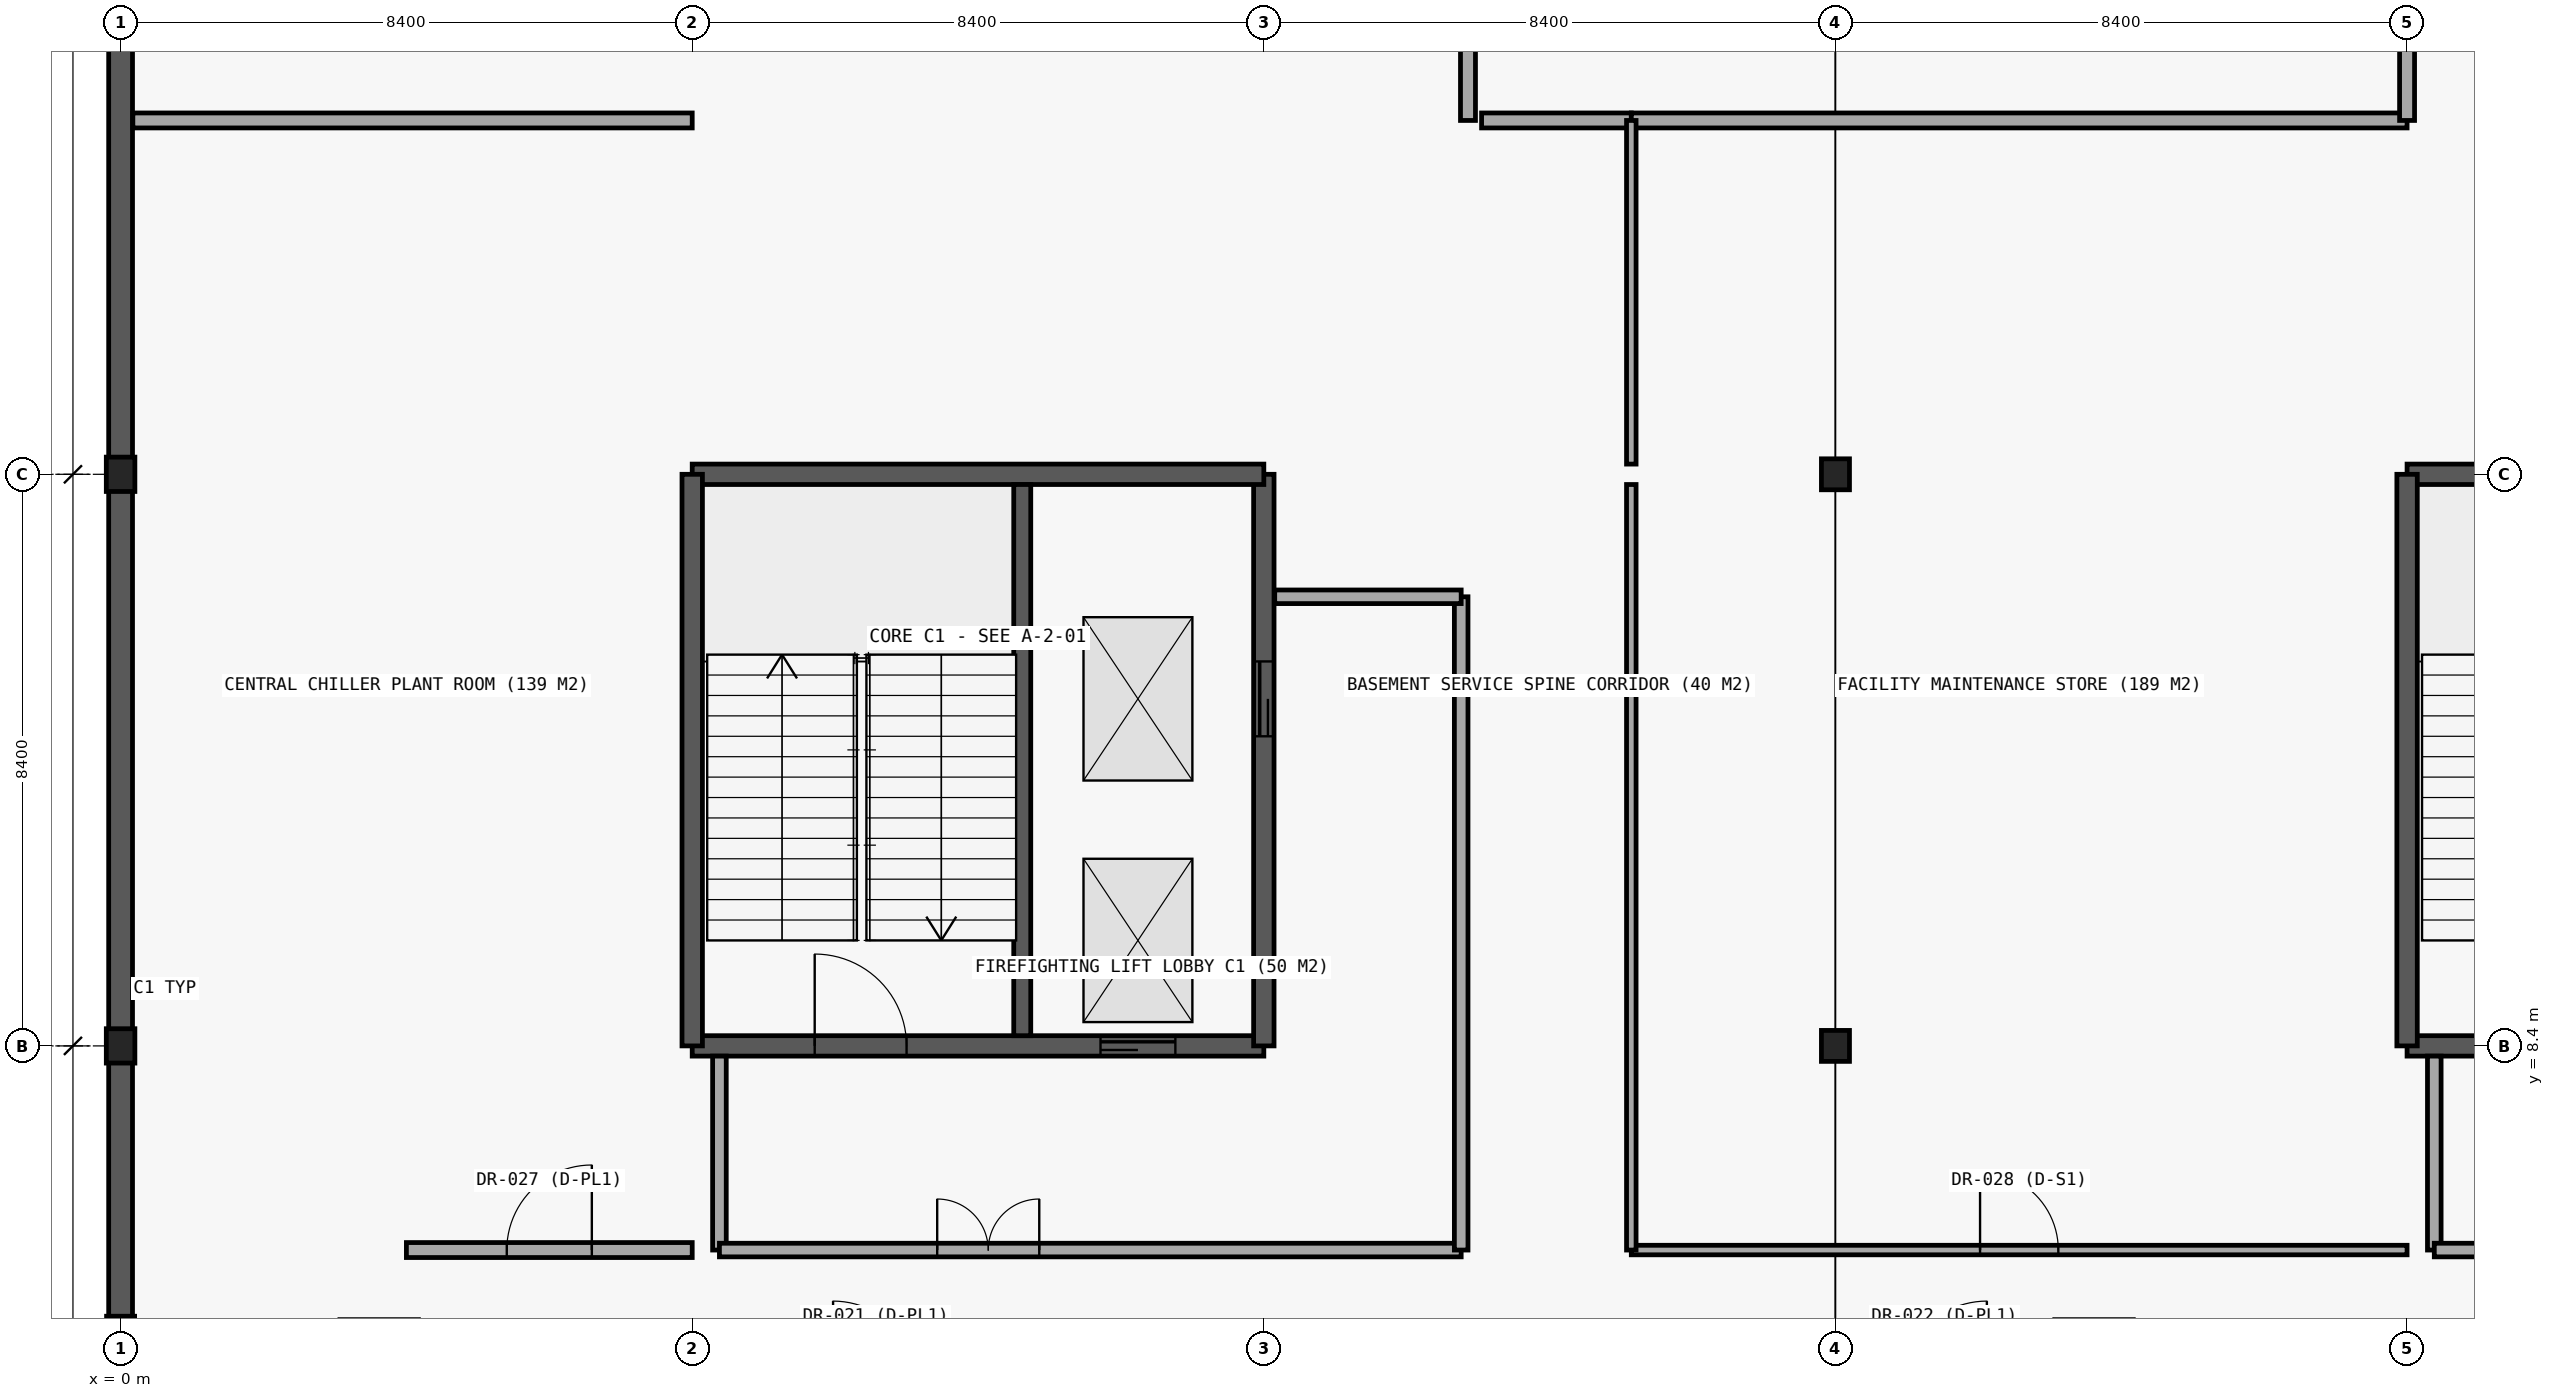
"""IFC4 building model, lengths in metres.
Left out: names, types, materials, properties, quantities, classifications, styles, units other than length and angle.
Written with IfcOpenShell. Run it as: python <this file> out.ifc"""

import sys

from ifc_helpers import new_model, si_unit, direction, frame, frame_2d, origin, origin_2d, place, context, subcontext, project, spatial, rectangle, i_section, extrude, element, fill, save


model = new_model("IFC4")
c1 = context("Model", 3, precision=1e-05, world=origin(), true_north=direction((0.0, 1.0)))
c2 = subcontext(c1, "Body", "Model", "MODEL_VIEW")
j1 = project(units=[si_unit("LENGTHUNIT", "METRE"), si_unit("PLANEANGLEUNIT", "RADIAN")], contexts=[c1])
p1 = place(None, origin())
s1 = spatial("IfcSite", under=j1, at=p1, CompositionType="ELEMENT")
p2 = place(p1, origin())
s2 = spatial("IfcBuilding", under=s1, at=p2, CompositionType="ELEMENT")
p3 = place(p2, frame((0.0, 0.0, -4.5)))
s3 = spatial("IfcBuildingStorey", under=s2, at=p3, CompositionType="ELEMENT", Elevation=-4.5)
p4 = place(p3, frame((8.4, 8.4, -0.35), z_axis=(0.0, 0.0, 1.0), x_axis=(1.0, 0.0, 0.0)))
e1 = element("IfcWall", 1, at=p4, inside=s3, PredefinedType="SHEAR", context=c2, shape_type="SweptSolid", body=[
    extrude(rectangle(XDim=8.4, YDim=0.3, at=frame_2d((4.2, 0.0))), origin(), (0.0, 0.0, 1.0), 4.85),
])
p5 = place(p4, frame((1.8, 0.0, 0.35)))
e2 = element("IfcOpeningElement", 2, at=p5, cuts=e1, PredefinedType="OPENING", context=c2, shape_type="SweptSolid", body=[
    extrude(rectangle(XDim=1.35, YDim=2.2, at=frame_2d((0.675, 1.1))), frame((0.0, 0.16, 0.0), z_axis=(0.0, -1.0, 0.0), x_axis=(1.0, 0.0, 0.0)), (0.0, 0.0, 1.0), 0.32),
])
p6 = place(p4, frame((6.0, 0.0, 0.35)))
e3 = element("IfcOpeningElement", 3, at=p6, cuts=e1, PredefinedType="OPENING", context=c2, shape_type="SweptSolid", body=[
    extrude(rectangle(XDim=1.1, YDim=2.2, at=frame_2d((0.55, 1.1))), frame((0.0, 0.16, 0.0), z_axis=(0.0, -1.0, 0.0), x_axis=(1.0, 0.0, 0.0)), (0.0, 0.0, 1.0), 0.32),
])
p7 = place(p3, frame((16.8, 8.4, -0.35), z_axis=(0.0, 0.0, 1.0), x_axis=(0.0, 1.0, 0.0)))
e4 = element("IfcWall", 4, at=p7, inside=s3, PredefinedType="SHEAR", context=c2, shape_type="SweptSolid", body=[
    extrude(rectangle(XDim=8.4, YDim=0.3, at=frame_2d((4.2, 0.0))), origin(), (0.0, 0.0, 1.0), 4.85),
])
p8 = place(p7, frame((4.55, 0.0, 0.35)))
e5 = element("IfcOpeningElement", 5, at=p8, cuts=e4, PredefinedType="OPENING", context=c2, shape_type="SweptSolid", body=[
    extrude(rectangle(XDim=1.1, YDim=2.2, at=frame_2d((0.55, 1.1))), frame((0.0, 0.16, 0.0), z_axis=(0.0, -1.0, 0.0), x_axis=(1.0, 0.0, 0.0)), (0.0, 0.0, 1.0), 0.32),
])
for number, where, z_axis, x_axis in (
    (6, (16.8, 16.8, -0.35), (0.0, 0.0, 1.0), (-1.0, 0.0, 0.0)),
    (7, (8.4, 16.8, -0.35), (0.0, 0.0, 1.0), (0.0, -1.0, 0.0)),
):
    element("IfcWall", number, at=place(p3, frame(where, z_axis=z_axis, x_axis=x_axis)), inside=s3, PredefinedType="SHEAR", context=c2, shape_type="SweptSolid", body=[
        extrude(rectangle(XDim=8.4, YDim=0.3, at=frame_2d((4.2, 0.0))), origin(), (0.0, 0.0, 1.0), 4.85),
    ])
p9 = place(p3, frame((13.25, 8.55, -0.35), z_axis=(0.0, 0.0, 1.0), x_axis=(0.0, 1.0, 0.0)))
e8 = element("IfcWall", 8, at=p9, inside=s3, PredefinedType="SHEAR", context=c2, shape_type="SweptSolid", body=[
    extrude(rectangle(XDim=8.1, YDim=0.25, at=frame_2d((4.05, 0.0))), origin(), (0.0, 0.0, 1.0), 4.85),
])
p10 = place(p3, frame((33.6, 8.4, -0.35), z_axis=(0.0, 0.0, 1.0), x_axis=(1.0, 0.0, 0.0)))
e9 = element("IfcWall", 9, at=p10, inside=s3, PredefinedType="SHEAR", context=c2, shape_type="SweptSolid", body=[
    extrude(rectangle(XDim=8.4, YDim=0.3, at=frame_2d((4.2, 0.0))), origin(), (0.0, 0.0, 1.0), 4.85),
])
p11 = place(p10, frame((1.8, 0.0, 0.35)))
e10 = element("IfcOpeningElement", 10, at=p11, cuts=e9, PredefinedType="OPENING", context=c2, shape_type="SweptSolid", body=[
    extrude(rectangle(XDim=1.35, YDim=2.2, at=frame_2d((0.675, 1.1))), frame((0.0, 0.16, 0.0), z_axis=(0.0, -1.0, 0.0), x_axis=(1.0, 0.0, 0.0)), (0.0, 0.0, 1.0), 0.32),
])
p12 = place(p10, frame((6.0, 0.0, 0.35)))
e11 = element("IfcOpeningElement", 11, at=p12, cuts=e9, PredefinedType="OPENING", context=c2, shape_type="SweptSolid", body=[
    extrude(rectangle(XDim=1.1, YDim=2.2, at=frame_2d((0.55, 1.1))), frame((0.0, 0.16, 0.0), z_axis=(0.0, -1.0, 0.0), x_axis=(1.0, 0.0, 0.0)), (0.0, 0.0, 1.0), 0.32),
])
p13 = place(p3, frame((42.0, 16.8, -0.35), z_axis=(0.0, 0.0, 1.0), x_axis=(-1.0, 0.0, 0.0)))
e12 = element("IfcWall", 12, at=p13, inside=s3, PredefinedType="SHEAR", context=c2, shape_type="SweptSolid", body=[
    extrude(rectangle(XDim=8.4, YDim=0.3, at=frame_2d((4.2, 0.0))), origin(), (0.0, 0.0, 1.0), 4.85),
])
p14 = place(p3, frame((33.6, 16.8, -0.35), z_axis=(0.0, 0.0, 1.0), x_axis=(0.0, -1.0, 0.0)))
e13 = element("IfcWall", 13, at=p14, inside=s3, PredefinedType="SHEAR", context=c2, shape_type="SweptSolid", body=[
    extrude(rectangle(XDim=8.4, YDim=0.3, at=frame_2d((4.2, 0.0))), origin(), (0.0, 0.0, 1.0), 4.85),
])
p15 = place(p3, frame((0.0, 16.8, -0.35), z_axis=(0.0, 0.0, 1.0), x_axis=(0.0, -1.0, 0.0)))
e14 = element("IfcWall", 14, at=p15, inside=s3, PredefinedType="SOLIDWALL", context=c2, shape_type="SweptSolid", body=[
    extrude(rectangle(XDim=8.4, YDim=0.35, at=frame_2d((4.2, 0.0))), origin(), (0.0, 0.0, 1.0), 4.6),
])
p16 = place(p3, frame((0.0, 25.2, -0.35), z_axis=(0.0, 0.0, 1.0), x_axis=(0.0, -1.0, 0.0)))
e15 = element("IfcWall", 15, at=p16, inside=s3, PredefinedType="SOLIDWALL", context=c2, shape_type="SweptSolid", body=[
    extrude(rectangle(XDim=8.4, YDim=0.35, at=frame_2d((4.2, 0.0))), origin(), (0.0, 0.0, 1.0), 4.6),
])
p17 = place(p3, frame((0.0, 8.4, -0.35), z_axis=(0.0, 0.0, 1.0), x_axis=(0.0, -1.0, 0.0)))
e16 = element("IfcWall", 16, at=p17, inside=s3, PredefinedType="SOLIDWALL", context=c2, shape_type="SweptSolid", body=[
    extrude(rectangle(XDim=4.2, YDim=0.35, at=frame_2d((2.1, 0.0))), origin(), (0.0, 0.0, 1.0), 4.6),
])
for number, where, z_axis, x_axis in (
    (17, (0.0, 8.4, -0.35), (0.0, 0.0, 1.0), (1.0, 0.0, 0.0)),
    (18, (0.0, 16.8, -0.35), (0.0, 0.0, 1.0), (1.0, 0.0, 0.0)),
):
    element("IfcColumn", number, at=place(p3, frame(where, z_axis=z_axis, x_axis=x_axis)), inside=s3, PredefinedType="COLUMN", context=c2, shape_type="SweptSolid", body=[
        extrude(i_section(OverallWidth=0.42, OverallDepth=0.505, WebThickness=0.037, FlangeThickness=0.059, FilletRadius=0.015, at=origin_2d()), origin(), (0.0, 0.0, 1.0), 4.85),
    ])
for number, where, z_axis, x_axis in (
    (19, (25.2, 8.4, -0.35), (0.0, 0.0, 1.0), (1.0, 0.0, 0.0)),
    (20, (25.2, 16.8, -0.35), (0.0, 0.0, 1.0), (1.0, 0.0, 0.0)),
    (21, (0.0, 4.2, -0.35), (0.0, 0.0, 1.0), (1.0, 0.0, 0.0)),
):
    element("IfcColumn", number, at=place(p3, frame(where, z_axis=z_axis, x_axis=x_axis)), inside=s3, PredefinedType="COLUMN", context=c2, shape_type="SweptSolid", body=[
        extrude(i_section(OverallWidth=0.412, OverallDepth=0.455, WebThickness=0.031, FlangeThickness=0.049, FilletRadius=0.015, at=origin_2d()), origin(), (0.0, 0.0, 1.0), 4.85),
    ])
p18 = place(p3, frame((8.8, 5.4, 0.0), z_axis=(0.0, 0.0, 1.0), x_axis=(0.0, 1.0, 0.0)))
e22 = element("IfcWall", 22, at=p18, inside=s3, PredefinedType="PARTITIONING", context=c2, shape_type="SweptSolid", body=[
    extrude(rectangle(XDim=2.85, YDim=0.2, at=frame_2d((1.425, 0.0))), origin(), (0.0, 0.0, 1.0), 3.82),
])
p19 = place(p3, frame((8.8, 5.4, 0.0), z_axis=(0.0, 0.0, 1.0), x_axis=(1.0, 0.0, 0.0)))
e23 = element("IfcWall", 23, at=p19, inside=s3, PredefinedType="PARTITIONING", context=c2, shape_type="SweptSolid", body=[
    extrude(rectangle(XDim=10.9, YDim=0.2, at=frame_2d((5.45, 0.0))), origin(), (0.0, 0.0, 1.0), 3.82),
])
p20 = place(p19, frame((3.2, 0.0, 0.0)))
e24 = element("IfcOpeningElement", 24, at=p20, cuts=e23, PredefinedType="OPENING", context=c2, shape_type="SweptSolid", body=[
    extrude(rectangle(XDim=1.5, YDim=2.2, at=frame_2d((0.75, 1.1))), frame((0.0, 0.11, 0.0), z_axis=(0.0, -1.0, 0.0), x_axis=(1.0, 0.0, 0.0)), (0.0, 0.0, 1.0), 0.22),
])
p21 = place(p3, frame((19.7, 5.4, 0.0), z_axis=(0.0, 0.0, 1.0), x_axis=(0.0, 1.0, 0.0)))
e25 = element("IfcWall", 25, at=p21, inside=s3, PredefinedType="PARTITIONING", context=c2, shape_type="SweptSolid", body=[
    extrude(rectangle(XDim=9.6, YDim=0.2, at=frame_2d((4.8, 0.0))), origin(), (0.0, 0.0, 1.0), 3.82),
])
p22 = place(p3, frame((16.96, 15.0, 0.0), z_axis=(0.0, 0.0, 1.0), x_axis=(1.0, 0.0, 0.0)))
e26 = element("IfcWall", 26, at=p22, inside=s3, PredefinedType="PARTITIONING", context=c2, shape_type="SweptSolid", body=[
    extrude(rectangle(XDim=2.74, YDim=0.2, at=frame_2d((1.37, 0.0))), origin(), (0.0, 0.0, 1.0), 3.82),
])
p23 = place(p3, frame((34.0, 5.4, 0.0), z_axis=(0.0, 0.0, 1.0), x_axis=(0.0, 1.0, 0.0)))
e27 = element("IfcWall", 27, at=p23, inside=s3, PredefinedType="PARTITIONING", context=c2, shape_type="SweptSolid", body=[
    extrude(rectangle(XDim=2.85, YDim=0.2, at=frame_2d((1.425, 0.0))), origin(), (0.0, 0.0, 1.0), 3.75),
])
p24 = place(p3, frame((34.0, 5.4, 0.0), z_axis=(0.0, 0.0, 1.0), x_axis=(1.0, 0.0, 0.0)))
e28 = element("IfcWall", 28, at=p24, inside=s3, PredefinedType="PARTITIONING", context=c2, shape_type="SweptSolid", body=[
    extrude(rectangle(XDim=7.6, YDim=0.2, at=frame_2d((3.8, 0.0))), origin(), (0.0, 0.0, 1.0), 3.82),
])
p25 = place(p24, frame((3.05, 0.0, 0.0)))
e29 = element("IfcOpeningElement", 29, at=p25, cuts=e28, PredefinedType="OPENING", context=c2, shape_type="SweptSolid", body=[
    extrude(rectangle(XDim=1.5, YDim=2.2, at=frame_2d((0.75, 1.1))), frame((0.0, 0.11, 0.0), z_axis=(0.0, -1.0, 0.0), x_axis=(1.0, 0.0, 0.0)), (0.0, 0.0, 1.0), 0.22),
])
p26 = place(p3, frame((4.2, 5.4, 0.0), z_axis=(0.0, 0.0, 1.0), x_axis=(1.0, 0.0, 0.0)))
e30 = element("IfcWall", 30, at=p26, inside=s3, PredefinedType="PARTITIONING", context=c2, shape_type="SweptSolid", body=[
    extrude(rectangle(XDim=4.2, YDim=0.22, at=frame_2d((2.1, 0.0))), origin(), (0.0, 0.0, 1.0), 3.8),
])
p27 = place(p26, frame((1.475, 0.0, 0.0)))
e31 = element("IfcOpeningElement", 31, at=p27, cuts=e30, PredefinedType="OPENING", context=c2, shape_type="SweptSolid", body=[
    extrude(rectangle(XDim=1.25, YDim=2.2, at=frame_2d((0.625, 1.1))), frame((0.0, 0.12, 0.0), z_axis=(0.0, -1.0, 0.0), x_axis=(1.0, 0.0, 0.0)), (0.0, 0.0, 1.0), 0.24),
])
p28 = place(p3, frame((22.2, 5.4, 0.0), z_axis=(0.0, 0.0, 1.0), x_axis=(1.0, 0.0, 0.0)))
e32 = element("IfcWall", 32, at=p28, inside=s3, PredefinedType="PARTITIONING", context=c2, shape_type="SweptSolid", body=[
    extrude(rectangle(XDim=11.4, YDim=0.14, at=frame_2d((5.7, 0.0))), origin(), (0.0, 0.0, 1.0), 3.8),
])
p29 = place(p28, frame((5.125, 0.0, 0.0)))
e33 = element("IfcOpeningElement", 33, at=p29, cuts=e32, PredefinedType="OPENING", context=c2, shape_type="SweptSolid", body=[
    extrude(rectangle(XDim=1.15, YDim=2.15, at=frame_2d((0.575, 1.075))), frame((0.0, 0.08, 0.0), z_axis=(0.0, -1.0, 0.0), x_axis=(1.0, 0.0, 0.0)), (0.0, 0.0, 1.0), 0.16),
])
p30 = place(p3, frame((0.18, 22.0, 0.0), z_axis=(0.0, 0.0, 1.0), x_axis=(1.0, 0.0, 0.0)))
e34 = element("IfcWall", 34, at=p30, inside=s3, PredefinedType="PARTITIONING", context=c2, shape_type="SweptSolid", body=[
    extrude(rectangle(XDim=8.22, YDim=0.22, at=frame_2d((4.11, 0.0))), origin(), (0.0, 0.0, 1.0), 3.8),
])
p31 = place(p3, frame((20.0, 22.0, 0.0), z_axis=(0.0, 0.0, 1.0), x_axis=(1.0, 0.0, 0.0)))
e35 = element("IfcWall", 35, at=p31, inside=s3, PredefinedType="PARTITIONING", context=c2, shape_type="SweptSolid", body=[
    extrude(rectangle(XDim=2.2, YDim=0.22, at=frame_2d((1.1, 0.0))), origin(), (0.0, 0.0, 1.0), 3.8),
])
p32 = place(p3, frame((22.2, 22.0, 0.0), z_axis=(0.0, 0.0, 1.0), x_axis=(1.0, 0.0, 0.0)))
e36 = element("IfcWall", 36, at=p32, inside=s3, PredefinedType="PARTITIONING", context=c2, shape_type="SweptSolid", body=[
    extrude(rectangle(XDim=11.4, YDim=0.22, at=frame_2d((5.7, 0.0))), origin(), (0.0, 0.0, 1.0), 3.8),
])
p33 = place(p3, frame((19.8, 22.0, 0.0), z_axis=(0.0, 0.0, 1.0), x_axis=(0.0, 1.0, 0.0)))
e37 = element("IfcWall", 37, at=p33, inside=s3, PredefinedType="PARTITIONING", context=c2, shape_type="SweptSolid", body=[
    extrude(rectangle(XDim=20.0, YDim=0.22, at=frame_2d((10.0, 0.0))), origin(), (0.0, 0.0, 1.0), 3.8),
])
p34 = place(p33, frame((4.72, 0.0, 0.0)))
e38 = element("IfcOpeningElement", 38, at=p34, cuts=e37, PredefinedType="OPENING", context=c2, shape_type="SweptSolid", body=[
    extrude(rectangle(XDim=1.25, YDim=2.2, at=frame_2d((0.625, 1.1))), frame((0.0, 0.12, 0.0), z_axis=(0.0, -1.0, 0.0), x_axis=(1.0, 0.0, 0.0)), (0.0, 0.0, 1.0), 0.24),
])
p35 = place(p3, frame((22.2, 5.4, 0.0), z_axis=(0.0, 0.0, 1.0), x_axis=(0.0, 1.0, 0.0)))
e39 = element("IfcWall", 39, at=p35, inside=s3, PredefinedType="PARTITIONING", context=c2, shape_type="SweptSolid", body=[
    extrude(rectangle(XDim=11.25, YDim=0.14, at=frame_2d((5.625, 0.0))), origin(), (0.0, 0.0, 1.0), 3.8),
])
p36 = place(p3, frame((22.2, 16.95, 0.0), z_axis=(0.0, 0.0, 1.0), x_axis=(0.0, 1.0, 0.0)))
e40 = element("IfcWall", 40, at=p36, inside=s3, PredefinedType="PARTITIONING", context=c2, shape_type="SweptSolid", body=[
    extrude(rectangle(XDim=5.05, YDim=0.14, at=frame_2d((2.525, 0.0))), origin(), (0.0, 0.0, 1.0), 3.8),
])
p37 = place(p3, frame((33.6, 22.0, 0.0), z_axis=(0.0, 0.0, 1.0), x_axis=(0.0, 1.0, 0.0)))
e41 = element("IfcWall", 41, at=p37, inside=s3, PredefinedType="PARTITIONING", context=c2, shape_type="SweptSolid", body=[
    extrude(rectangle(XDim=20.0, YDim=0.22, at=frame_2d((10.0, 0.0))), origin(), (0.0, 0.0, 1.0), 3.75),
])
p38 = place(p37, frame((5.42, 0.0, 0.0)))
e42 = element("IfcOpeningElement", 42, at=p38, cuts=e41, PredefinedType="OPENING", context=c2, shape_type="SweptSolid", body=[
    extrude(rectangle(XDim=1.25, YDim=2.2, at=frame_2d((0.625, 1.1))), frame((0.0, 0.12, 0.0), z_axis=(0.0, -1.0, 0.0), x_axis=(1.0, 0.0, 0.0)), (0.0, 0.0, 1.0), 0.24),
])
p39 = place(p5, origin())
e43 = element("IfcDoor", 43, at=p39, inside=s3, OperationType="SINGLE_SWING_LEFT", PredefinedType="DOOR", context=c2, shape_type="SweptSolid", body=[
    extrude(rectangle(XDim=1.35, YDim=2.2, at=frame_2d((0.675, 1.1))), frame((0.0, 0.025, 0.0), z_axis=(0.0, -1.0, 0.0), x_axis=(1.0, 0.0, 0.0)), (0.0, 0.0, 1.0), 0.05),
])
fill(e2, e43)
p40 = place(p6, origin())
e44 = element("IfcDoor", 44, at=p40, inside=s3, OperationType="SLIDING_TO_LEFT", PredefinedType="DOOR", context=c2, shape_type="SweptSolid", body=[
    extrude(rectangle(XDim=1.1, YDim=2.2, at=frame_2d((0.55, 1.1))), frame((0.0, 0.025, 0.0), z_axis=(0.0, -1.0, 0.0), x_axis=(1.0, 0.0, 0.0)), (0.0, 0.0, 1.0), 0.05),
])
fill(e3, e44)
p41 = place(p8, origin())
e45 = element("IfcDoor", 45, at=p41, inside=s3, OperationType="SLIDING_TO_RIGHT", PredefinedType="DOOR", context=c2, shape_type="SweptSolid", body=[
    extrude(rectangle(XDim=1.1, YDim=2.2, at=frame_2d((0.55, 1.1))), frame((0.0, 0.025, 0.0), z_axis=(0.0, -1.0, 0.0), x_axis=(1.0, 0.0, 0.0)), (0.0, 0.0, 1.0), 0.05),
])
fill(e5, e45)
p42 = place(p20, origin())
e46 = element("IfcDoor", 46, at=p42, inside=s3, OperationType="DOUBLE_DOOR_SINGLE_SWING", PredefinedType="DOOR", context=c2, shape_type="SweptSolid", body=[
    extrude(rectangle(XDim=1.5, YDim=2.2, at=frame_2d((0.75, 1.1))), frame((0.0, 0.025, 0.0), z_axis=(0.0, -1.0, 0.0), x_axis=(1.0, 0.0, 0.0)), (0.0, 0.0, 1.0), 0.05),
])
fill(e24, e46)
p43 = place(p27, origin())
e47 = element("IfcDoor", 47, at=p43, inside=s3, OperationType="SINGLE_SWING_RIGHT", PredefinedType="DOOR", context=c2, shape_type="SweptSolid", body=[
    extrude(rectangle(XDim=1.25, YDim=2.2, at=frame_2d((0.625, 1.1))), frame((0.0, 0.025, 0.0), z_axis=(0.0, -1.0, 0.0), x_axis=(1.0, 0.0, 0.0)), (0.0, 0.0, 1.0), 0.05),
])
fill(e31, e47)
p44 = place(p29, origin())
e48 = element("IfcDoor", 48, at=p44, inside=s3, OperationType="SINGLE_SWING_LEFT", PredefinedType="DOOR", context=c2, shape_type="SweptSolid", body=[
    extrude(rectangle(XDim=1.15, YDim=2.15, at=frame_2d((0.575, 1.075))), frame((0.0, 0.025, 0.0), z_axis=(0.0, -1.0, 0.0), x_axis=(1.0, 0.0, 0.0)), (0.0, 0.0, 1.0), 0.05),
])
fill(e33, e48)
save(model, sys.argv[1])
